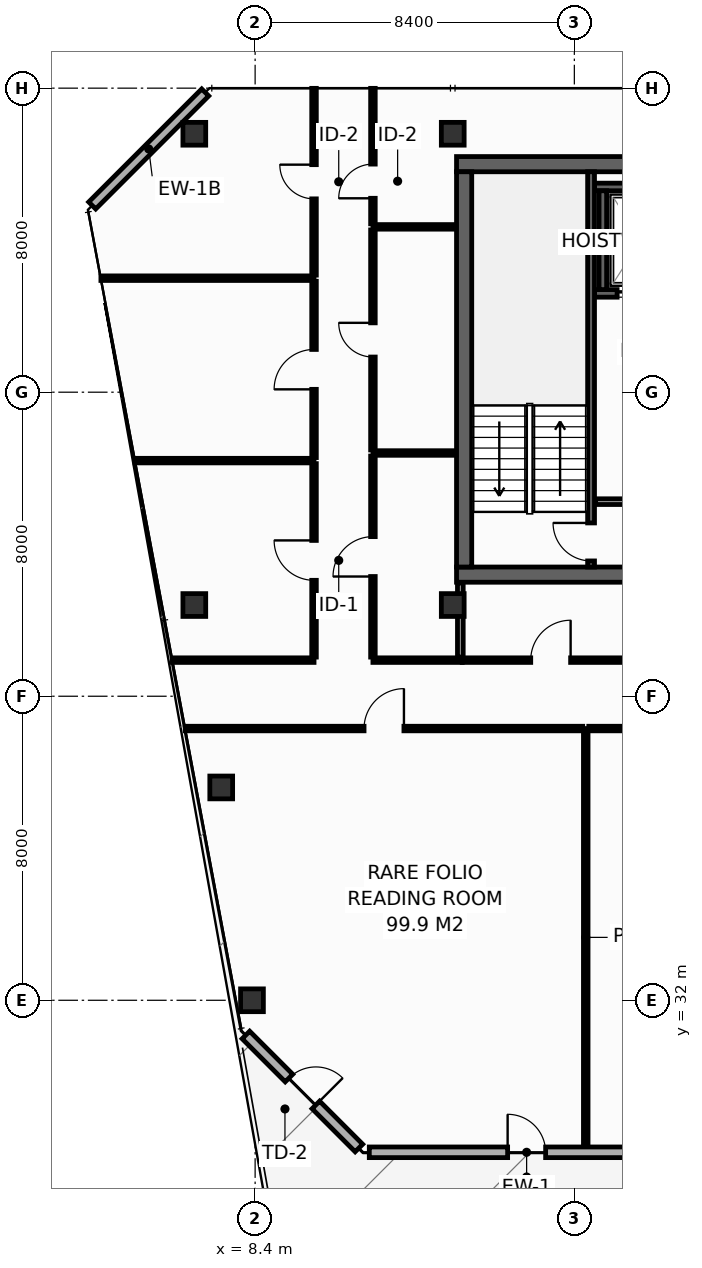
"""IFC4 building model, lengths in metres.
Left out: names, types, materials, properties, quantities, classifications, styles, units other than length and angle.
Written with IfcOpenShell. Run it as: python <this file> out.ifc"""

import sys

from ifc_helpers import new_model, si_unit, direction, frame, frame_2d, origin, origin_2d, place, context, subcontext, project, spatial, rectangle, hollow_rectangle, extrude, element, fill, save


model = new_model("IFC4")
c1 = context("Model", 3, precision=1e-05, world=origin(), true_north=direction((0.0, 1.0)))
c2 = subcontext(c1, "Body", "Model", "MODEL_VIEW")
j1 = project(units=[si_unit("LENGTHUNIT", "METRE"), si_unit("PLANEANGLEUNIT", "RADIAN")], contexts=[c1])
p1 = place(None, origin())
s1 = spatial("IfcSite", under=j1, at=p1, CompositionType="ELEMENT")
p2 = place(p1, origin())
s2 = spatial("IfcBuilding", under=s1, at=p2, CompositionType="ELEMENT")
p3 = place(p2, frame((0.0, 0.0, 276.2)))
s3 = spatial("IfcBuildingStorey", under=s2, at=p3, CompositionType="ELEMENT", Elevation=276.2)
p4 = place(p3, frame((13.7, 43.2, 0.0), z_axis=(0.0, 0.0, 1.0), x_axis=(1.0, 0.0, 0.0)))
e1 = element("IfcWall", 1, at=p4, inside=s3, PredefinedType="SHEAR", context=c2, shape_type="SweptSolid", body=[
    extrude(rectangle(XDim=32.5, YDim=0.4, at=frame_2d((16.25, 0.0))), origin(), (0.0, 0.0, 1.0), 3.55),
])
p5 = place(p4, frame((5.4, 0.0, 0.0)))
e2 = element("IfcOpeningElement", 2, at=p5, cuts=e1, PredefinedType="OPENING", context=c2, shape_type="SweptSolid", body=[
    extrude(rectangle(XDim=1.1, YDim=2.15, at=frame_2d((0.55, 1.075))), frame((0.0, 0.21, 0.0), z_axis=(0.0, -1.0, 0.0), x_axis=(1.0, 0.0, 0.0)), (0.0, 0.0, 1.0), 0.42),
])
p6 = place(p4, frame((25.6, 0.0, 0.0)))
e3 = element("IfcOpeningElement", 3, at=p6, cuts=e1, PredefinedType="OPENING", context=c2, shape_type="SweptSolid", body=[
    extrude(rectangle(XDim=1.1, YDim=2.15, at=frame_2d((0.55, 1.075))), frame((0.0, 0.21, 0.0), z_axis=(0.0, -1.0, 0.0), x_axis=(1.0, 0.0, 0.0)), (0.0, 0.0, 1.0), 0.42),
])
p7 = place(p3, frame((13.7, 54.0, 0.0), z_axis=(0.0, 0.0, 1.0), x_axis=(1.0, 0.0, 0.0)))
e4 = element("IfcWall", 4, at=p7, inside=s3, PredefinedType="SHEAR", context=c2, shape_type="SweptSolid", body=[
    extrude(rectangle(XDim=32.5, YDim=0.4, at=frame_2d((16.25, 0.0))), origin(), (0.0, 0.0, 1.0), 3.55),
])
p8 = place(p3, frame((13.9, 43.4, 0.0), z_axis=(0.0, 0.0, 1.0), x_axis=(0.0, 1.0, 0.0)))
e5 = element("IfcWall", 5, at=p8, inside=s3, PredefinedType="SHEAR", context=c2, shape_type="SweptSolid", body=[
    extrude(rectangle(XDim=10.4, YDim=0.4, at=frame_2d((5.2, 0.0))), origin(), (0.0, 0.0, 1.0), 3.55),
])
for number, where, z_axis, x_axis in (
    (6, (6.8, 54.8, 0.0), (0.0, 0.0, 1.0), (1.0, 0.0, 0.0)),
    (7, (13.6, 54.8, 0.0), (0.0, 0.0, 1.0), (1.0, 0.0, 0.0)),
    (8, (6.8, 42.4, 0.0), (0.0, 0.0, 1.0), (1.0, 0.0, 0.0)),
    (9, (13.6, 42.4, 0.0), (0.0, 0.0, 1.0), (1.0, 0.0, 0.0)),
    (10, (8.317, 32.0, 0.0), (0.0, 0.0, 1.0), (1.0, 0.0, 0.0)),
    (11, (7.508, 37.6, 0.0), (0.0, 0.0, 1.0), (1.0, 0.0, 0.0)),
):
    element("IfcColumn", number, at=place(p3, frame(where, z_axis=z_axis, x_axis=x_axis)), inside=s3, PredefinedType="COLUMN", context=c2, shape_type="SweptSolid", body=[
        extrude(hollow_rectangle(XDim=0.6, YDim=0.6, WallThickness=0.028, at=origin_2d()), origin(), (0.0, 0.0, 1.0), 3.8),
    ])
p9 = place(p3, frame((17.33, 50.6, 0.0), z_axis=(0.0, 0.0, 1.0), x_axis=(1.0, 0.0, 0.0)))
e12 = element("IfcWall", 12, at=p9, inside=s3, PredefinedType="SHEAR", context=c2, shape_type="SweptSolid", body=[
    extrude(rectangle(XDim=2.52, YDim=0.2, at=frame_2d((1.26, 0.0))), origin(), (0.0, 0.0, 1.0), 3.55),
])
p10 = place(p9, frame((0.595, 0.0, 0.0)))
e13 = element("IfcOpeningElement", 13, at=p10, cuts=e12, PredefinedType="OPENING", context=c2, shape_type="SweptSolid", body=[
    extrude(rectangle(XDim=1.25, YDim=2.3, at=frame_2d((0.625, 1.15))), frame((0.0, 0.11, 0.0), z_axis=(0.0, -1.0, 0.0), x_axis=(1.0, 0.0, 0.0)), (0.0, 0.0, 1.0), 0.22),
])
p11 = place(p3, frame((17.33, 53.4, 0.0), z_axis=(0.0, 0.0, 1.0), x_axis=(1.0, 0.0, 0.0)))
e14 = element("IfcWall", 14, at=p11, inside=s3, PredefinedType="SHEAR", context=c2, shape_type="SweptSolid", body=[
    extrude(rectangle(XDim=2.52, YDim=0.2, at=frame_2d((1.26, 0.0))), origin(), (0.0, 0.0, 1.0), 3.55),
])
p12 = place(p3, frame((17.55, 50.7, 0.0), z_axis=(0.0, 0.0, 1.0), x_axis=(0.0, 1.0, 0.0)))
e15 = element("IfcWall", 15, at=p12, inside=s3, PredefinedType="SHEAR", context=c2, shape_type="SweptSolid", body=[
    extrude(rectangle(XDim=2.6, YDim=0.2, at=frame_2d((1.3, 0.0))), origin(), (0.0, 0.0, 1.0), 3.55),
])
p13 = place(p3, frame((17.24, 43.4, 0.0), z_axis=(0.0, 0.0, 1.0), x_axis=(0.0, 1.0, 0.0)))
e16 = element("IfcWall", 16, at=p13, inside=s3, PredefinedType="SHEAR", context=c2, shape_type="SweptSolid", body=[
    extrude(rectangle(XDim=10.4, YDim=0.18, at=frame_2d((5.2, 0.0))), origin(), (0.0, 0.0, 1.0), 3.55),
])
p14 = place(p13, frame((0.16, 0.0, 0.0)))
e17 = element("IfcOpeningElement", 17, at=p14, cuts=e16, PredefinedType="OPENING", context=c2, shape_type="SweptSolid", body=[
    extrude(rectangle(XDim=1.0, YDim=2.15, at=frame_2d((0.5, 1.075))), frame((0.0, 0.1, 0.0), z_axis=(0.0, -1.0, 0.0), x_axis=(1.0, 0.0, 0.0)), (0.0, 0.0, 1.0), 0.2),
])
p15 = place(p3, frame((17.36, 45.12, 0.0), z_axis=(0.0, 0.0, 1.0), x_axis=(1.0, 0.0, 0.0)))
e18 = element("IfcWall", 18, at=p15, inside=s3, PredefinedType="PARTITIONING", context=c2, shape_type="SweptSolid", body=[
    extrude(rectangle(XDim=5.14, YDim=0.15, at=frame_2d((2.57, 0.0))), origin(), (0.0, 0.0, 1.0), 3.55),
])
p16 = place(p15, frame((1.8, 0.0, 0.0)))
e19 = element("IfcOpeningElement", 19, at=p16, cuts=e18, PredefinedType="OPENING", context=c2, shape_type="SweptSolid", body=[
    extrude(rectangle(XDim=1.1, YDim=2.15, at=frame_2d((0.55, 1.075))), frame((0.0, 0.085, 0.0), z_axis=(0.0, -1.0, 0.0), x_axis=(1.0, 0.0, 0.0)), (0.0, 0.0, 1.0), 0.17),
])
p17 = place(p3, frame((8.157, 31.087, 0.0), z_axis=(0.0, 0.0, 1.0), x_axis=(0.707106781187, -0.707106781187, 0.0)))
e20 = element("IfcWall", 20, at=p17, inside=s3, PredefinedType="STANDARD", context=c2, shape_type="SweptSolid", body=[
    extrude(rectangle(XDim=4.206, YDim=0.28, at=frame_2d((2.103, 0.0))), origin(), (0.0, 0.0, 1.0), 3.55),
])
p18 = place(p17, frame((1.603, 0.0, 0.0)))
e21 = element("IfcOpeningElement", 21, at=p18, cuts=e20, PredefinedType="OPENING", context=c2, shape_type="SweptSolid", body=[
    extrude(rectangle(XDim=1.0, YDim=2.2, at=frame_2d((0.5, 1.1))), frame((0.0, 0.15, 0.0), z_axis=(0.0, -1.0, 0.0), x_axis=(1.0, 0.0, 0.0)), (0.0, 0.0, 1.0), 0.3),
])
p19 = place(p3, frame((11.404, 28.0, 0.0), z_axis=(0.0, 0.0, 1.0), x_axis=(1.0, 0.0, 0.0)))
e22 = element("IfcWall", 22, at=p19, inside=s3, PredefinedType="STANDARD", context=c2, shape_type="SweptSolid", body=[
    extrude(rectangle(XDim=8.28, YDim=0.28, at=frame_2d((4.14, 0.0))), origin(), (0.0, 0.0, 1.0), 3.55),
])
p20 = place(p19, frame((3.64, 0.0, 0.0)))
e23 = element("IfcOpeningElement", 23, at=p20, cuts=e22, PredefinedType="OPENING", context=c2, shape_type="SweptSolid", body=[
    extrude(rectangle(XDim=1.0, YDim=2.2, at=frame_2d((0.5, 1.1))), frame((0.0, 0.15, 0.0), z_axis=(0.0, -1.0, 0.0), x_axis=(1.0, 0.0, 0.0)), (0.0, 0.0, 1.0), 0.3),
])
p21 = place(p3, frame((7.087, 55.887, 0.0), z_axis=(0.0, 0.0, 1.0), x_axis=(-0.707106781187, -0.707106781187, 0.0)))
e24 = element("IfcWall", 24, at=p21, inside=s3, PredefinedType="STANDARD", context=c2, shape_type="SweptSolid", body=[
    extrude(rectangle(XDim=4.206, YDim=0.26, at=frame_2d((2.103, 0.0))), origin(), (0.0, 0.0, 1.0), 3.55),
])
p22 = place(p3, frame((6.224, 40.95, 0.0), z_axis=(0.0, 0.0, 1.0), x_axis=(1.0, 0.0, 0.0)))
e25 = element("IfcWall", 25, at=p22, inside=s3, PredefinedType="PARTITIONING", context=c2, shape_type="SweptSolid", body=[
    extrude(rectangle(XDim=3.726, YDim=0.12, at=frame_2d((1.863, 0.0))), origin(), (0.0, 0.0, 1.0), 3.085),
])
p23 = place(p3, frame((11.5, 40.95, 0.0), z_axis=(0.0, 0.0, 1.0), x_axis=(1.0, 0.0, 0.0)))
e26 = element("IfcWall", 26, at=p23, inside=s3, PredefinedType="PARTITIONING", context=c2, shape_type="SweptSolid", body=[
    extrude(rectangle(XDim=2.35, YDim=0.12, at=frame_2d((1.175, 0.0))), origin(), (0.0, 0.0, 1.0), 3.55),
])
p24 = place(p3, frame((11.5, 52.35, 0.0), z_axis=(0.0, 0.0, 1.0), x_axis=(1.0, 0.0, 0.0)))
e27 = element("IfcWall", 27, at=p24, inside=s3, PredefinedType="PARTITIONING", context=c2, shape_type="SweptSolid", body=[
    extrude(rectangle(XDim=2.18, YDim=0.12, at=frame_2d((1.09, 0.0))), origin(), (0.0, 0.0, 1.0), 3.55),
])
p25 = place(p3, frame((11.5, 52.43, 0.0), z_axis=(0.0, 0.0, 1.0), x_axis=(0.0, 1.0, 0.0)))
e28 = element("IfcWall", 28, at=p25, inside=s3, PredefinedType="PARTITIONING", context=c2, shape_type="SweptSolid", body=[
    extrude(rectangle(XDim=3.565, YDim=0.12, at=frame_2d((1.783, 0.0))), origin(), (0.0, 0.0, 1.0), 2.935),
])
p26 = place(p25, frame((0.672, 0.0, 0.0)))
e29 = element("IfcOpeningElement", 29, at=p26, cuts=e28, PredefinedType="OPENING", context=c2, shape_type="SweptSolid", body=[
    extrude(rectangle(XDim=0.9, YDim=2.1, at=frame_2d((0.45, 1.05))), frame((0.0, 0.07, 0.0), z_axis=(0.0, -1.0, 0.0), x_axis=(1.0, 0.0, 0.0)), (0.0, 0.0, 1.0), 0.14),
])
p27 = place(p3, frame((5.241, 46.2, 0.0), z_axis=(0.0, 0.0, 1.0), x_axis=(1.0, 0.0, 0.0)))
e30 = element("IfcWall", 30, at=p27, inside=s3, PredefinedType="PARTITIONING", context=c2, shape_type="SweptSolid", body=[
    extrude(rectangle(XDim=4.709, YDim=0.12, at=frame_2d((2.354, 0.0))), origin(), (0.0, 0.0, 1.0), 2.947),
])
p28 = place(p3, frame((4.342, 51.0, 0.0), z_axis=(0.0, 0.0, 1.0), x_axis=(1.0, 0.0, 0.0)))
e31 = element("IfcWall", 31, at=p28, inside=s3, PredefinedType="PARTITIONING", context=c2, shape_type="SweptSolid", body=[
    extrude(rectangle(XDim=5.608, YDim=0.12, at=frame_2d((2.804, 0.0))), origin(), (0.0, 0.0, 1.0), 2.947),
])
p29 = place(p3, frame((9.95, 41.03, 0.0), z_axis=(0.0, 0.0, 1.0), x_axis=(0.0, 1.0, 0.0)))
e32 = element("IfcWall", 32, at=p29, inside=s3, PredefinedType="PARTITIONING", context=c2, shape_type="SweptSolid", body=[
    extrude(rectangle(XDim=5.09, YDim=0.12, at=frame_2d((2.545, 0.0))), origin(), (0.0, 0.0, 1.0), 2.947),
])
p30 = place(p29, frame((2.02, 0.0, 0.0)))
e33 = element("IfcOpeningElement", 33, at=p30, cuts=e32, PredefinedType="OPENING", context=c2, shape_type="SweptSolid", body=[
    extrude(rectangle(XDim=1.05, YDim=2.15, at=frame_2d((0.525, 1.075))), frame((0.0, 0.07, 0.0), z_axis=(0.0, -1.0, 0.0), x_axis=(1.0, 0.0, 0.0)), (0.0, 0.0, 1.0), 0.14),
])
p31 = place(p3, frame((9.95, 46.28, 0.0), z_axis=(0.0, 0.0, 1.0), x_axis=(0.0, 1.0, 0.0)))
e34 = element("IfcWall", 34, at=p31, inside=s3, PredefinedType="PARTITIONING", context=c2, shape_type="SweptSolid", body=[
    extrude(rectangle(XDim=4.64, YDim=0.12, at=frame_2d((2.32, 0.0))), origin(), (0.0, 0.0, 1.0), 3.55),
])
p32 = place(p31, frame((1.795, 0.0, 0.0)))
e35 = element("IfcOpeningElement", 35, at=p32, cuts=e34, PredefinedType="OPENING", context=c2, shape_type="SweptSolid", body=[
    extrude(rectangle(XDim=1.05, YDim=2.15, at=frame_2d((0.525, 1.075))), frame((0.0, 0.07, 0.0), z_axis=(0.0, -1.0, 0.0), x_axis=(1.0, 0.0, 0.0)), (0.0, 0.0, 1.0), 0.14),
])
p33 = place(p3, frame((9.95, 51.08, 0.0), z_axis=(0.0, 0.0, 1.0), x_axis=(0.0, 1.0, 0.0)))
e36 = element("IfcWall", 36, at=p33, inside=s3, PredefinedType="PARTITIONING", context=c2, shape_type="SweptSolid", body=[
    extrude(rectangle(XDim=4.915, YDim=0.12, at=frame_2d((2.458, 0.0))), origin(), (0.0, 0.0, 1.0), 2.935),
])
p34 = place(p33, frame((2.007, 0.0, 0.0)))
e37 = element("IfcOpeningElement", 37, at=p34, cuts=e36, PredefinedType="OPENING", context=c2, shape_type="SweptSolid", body=[
    extrude(rectangle(XDim=0.9, YDim=2.1, at=frame_2d((0.45, 1.05))), frame((0.0, 0.07, 0.0), z_axis=(0.0, -1.0, 0.0), x_axis=(1.0, 0.0, 0.0)), (0.0, 0.0, 1.0), 0.14),
])
p35 = place(p3, frame((11.5, 46.4, 0.0), z_axis=(0.0, 0.0, 1.0), x_axis=(1.0, 0.0, 0.0)))
e38 = element("IfcWall", 38, at=p35, inside=s3, PredefinedType="PARTITIONING", context=c2, shape_type="SweptSolid", body=[
    extrude(rectangle(XDim=2.18, YDim=0.12, at=frame_2d((1.09, 0.0))), origin(), (0.0, 0.0, 1.0), 3.55),
])
p36 = place(p3, frame((11.5, 41.03, 0.0), z_axis=(0.0, 0.0, 1.0), x_axis=(0.0, 1.0, 0.0)))
e39 = element("IfcWall", 39, at=p36, inside=s3, PredefinedType="PARTITIONING", context=c2, shape_type="SweptSolid", body=[
    extrude(rectangle(XDim=5.29, YDim=0.12, at=frame_2d((2.645, 0.0))), origin(), (0.0, 0.0, 1.0), 2.947),
])
p37 = place(p36, frame((2.12, 0.0, 0.0)))
e40 = element("IfcOpeningElement", 40, at=p37, cuts=e39, PredefinedType="OPENING", context=c2, shape_type="SweptSolid", body=[
    extrude(rectangle(XDim=1.05, YDim=2.15, at=frame_2d((0.525, 1.075))), frame((0.0, 0.07, 0.0), z_axis=(0.0, -1.0, 0.0), x_axis=(1.0, 0.0, 0.0)), (0.0, 0.0, 1.0), 0.14),
])
p38 = place(p3, frame((11.5, 46.48, 0.0), z_axis=(0.0, 0.0, 1.0), x_axis=(0.0, 1.0, 0.0)))
e41 = element("IfcWall", 41, at=p38, inside=s3, PredefinedType="PARTITIONING", context=c2, shape_type="SweptSolid", body=[
    extrude(rectangle(XDim=5.79, YDim=0.12, at=frame_2d((2.895, 0.0))), origin(), (0.0, 0.0, 1.0), 3.55),
])
p39 = place(p38, frame((2.445, 0.0, 0.0)))
e42 = element("IfcOpeningElement", 42, at=p39, cuts=e41, PredefinedType="OPENING", context=c2, shape_type="SweptSolid", body=[
    extrude(rectangle(XDim=0.9, YDim=2.1, at=frame_2d((0.45, 1.05))), frame((0.0, 0.07, 0.0), z_axis=(0.0, -1.0, 0.0), x_axis=(1.0, 0.0, 0.0)), (0.0, 0.0, 1.0), 0.14),
])
p40 = place(p3, frame((13.8, 41.03, 0.0), z_axis=(0.0, 0.0, 1.0), x_axis=(0.0, 1.0, 0.0)))
e43 = element("IfcWall", 43, at=p40, inside=s3, PredefinedType="PARTITIONING", context=c2, shape_type="SweptSolid", body=[
    extrude(rectangle(XDim=1.95, YDim=0.15, at=frame_2d((0.975, 0.0))), origin(), (0.0, 0.0, 1.0), 3.55),
])
p41 = place(p3, frame((13.85, 40.95, 0.0), z_axis=(0.0, 0.0, 1.0), x_axis=(1.0, 0.0, 0.0)))
e44 = element("IfcWall", 44, at=p41, inside=s3, PredefinedType="PARTITIONING", context=c2, shape_type="SweptSolid", body=[
    extrude(rectangle(XDim=4.655, YDim=0.12, at=frame_2d((2.327, 0.0))), origin(), (0.0, 0.0, 1.0), 3.55),
])
p42 = place(p41, frame((1.802, 0.0, 0.0)))
e45 = element("IfcOpeningElement", 45, at=p42, cuts=e44, PredefinedType="OPENING", context=c2, shape_type="SweptSolid", body=[
    extrude(rectangle(XDim=1.05, YDim=2.15, at=frame_2d((0.525, 1.075))), frame((0.0, 0.07, 0.0), z_axis=(0.0, -1.0, 0.0), x_axis=(1.0, 0.0, 0.0)), (0.0, 0.0, 1.0), 0.14),
])
p43 = place(p3, frame((17.1, 28.16, 0.0), z_axis=(0.0, 0.0, 1.0), x_axis=(0.0, 1.0, 0.0)))
e46 = element("IfcWall", 46, at=p43, inside=s3, PredefinedType="PARTITIONING", context=c2, shape_type="SweptSolid", body=[
    extrude(rectangle(XDim=10.99, YDim=0.12, at=frame_2d((5.495, 0.0))), origin(), (0.0, 0.0, 1.0), 2.947),
])
p44 = place(p3, frame((6.561, 39.15, 0.0), z_axis=(0.0, 0.0, 1.0), x_axis=(1.0, 0.0, 0.0)))
e47 = element("IfcWall", 47, at=p44, inside=s3, PredefinedType="PARTITIONING", context=c2, shape_type="SweptSolid", body=[
    extrude(rectangle(XDim=10.459, YDim=0.12, at=frame_2d((5.229, 0.0))), origin(), (0.0, 0.0, 1.0), 3.085),
])
p45 = place(p44, frame((4.705, 0.0, 0.0)))
e48 = element("IfcOpeningElement", 48, at=p45, cuts=e47, PredefinedType="OPENING", context=c2, shape_type="SweptSolid", body=[
    extrude(rectangle(XDim=1.05, YDim=2.15, at=frame_2d((0.525, 1.075))), frame((0.0, 0.07, 0.0), z_axis=(0.0, -1.0, 0.0), x_axis=(1.0, 0.0, 0.0)), (0.0, 0.0, 1.0), 0.14),
])
p46 = place(p3, frame((17.18, 39.15, 0.0), z_axis=(0.0, 0.0, 1.0), x_axis=(1.0, 0.0, 0.0)))
e49 = element("IfcWall", 49, at=p46, inside=s3, PredefinedType="PARTITIONING", context=c2, shape_type="SweptSolid", body=[
    extrude(rectangle(XDim=6.503, YDim=0.12, at=frame_2d((3.251, 0.0))), origin(), (0.0, 0.0, 1.0), 2.947),
])
p47 = place(p46, frame((2.726, 0.0, 0.0)))
e50 = element("IfcOpeningElement", 50, at=p47, cuts=e49, PredefinedType="OPENING", context=c2, shape_type="SweptSolid", body=[
    extrude(rectangle(XDim=1.05, YDim=2.15, at=frame_2d((0.525, 1.075))), frame((0.0, 0.07, 0.0), z_axis=(0.0, -1.0, 0.0), x_axis=(1.0, 0.0, 0.0)), (0.0, 0.0, 1.0), 0.14),
])
p48 = place(p10, origin())
e51 = element("IfcDoor", 51, at=p48, inside=s3, OperationType="SLIDING_TO_LEFT", PredefinedType="DOOR", context=c2, shape_type="SweptSolid", body=[
    extrude(rectangle(XDim=1.25, YDim=2.3, at=frame_2d((0.625, 1.15))), frame((0.0, 0.025, 0.0), z_axis=(0.0, -1.0, 0.0), x_axis=(1.0, 0.0, 0.0)), (0.0, 0.0, 1.0), 0.05),
])
fill(e13, e51)
p49 = place(p14, origin())
e52 = element("IfcDoor", 52, at=p49, inside=s3, OperationType="SINGLE_SWING_RIGHT", PredefinedType="DOOR", context=c2, shape_type="SweptSolid", body=[
    extrude(rectangle(XDim=1.0, YDim=2.15, at=frame_2d((0.5, 1.075))), frame((0.0, 0.025, 0.0), z_axis=(0.0, -1.0, 0.0), x_axis=(1.0, 0.0, 0.0)), (0.0, 0.0, 1.0), 0.05),
])
fill(e17, e52)
p50 = place(p18, origin())
e53 = element("IfcDoor", 53, at=p50, inside=s3, OperationType="SINGLE_SWING_RIGHT", PredefinedType="DOOR", context=c2, shape_type="SweptSolid", body=[
    extrude(rectangle(XDim=1.0, YDim=2.2, at=frame_2d((0.5, 1.1))), frame((0.0, 0.025, 0.0), z_axis=(0.0, -1.0, 0.0), x_axis=(1.0, 0.0, 0.0)), (0.0, 0.0, 1.0), 0.05),
])
fill(e21, e53)
p51 = place(p20, origin())
e54 = element("IfcDoor", 54, at=p51, inside=s3, OperationType="SINGLE_SWING_LEFT", PredefinedType="DOOR", context=c2, shape_type="SweptSolid", body=[
    extrude(rectangle(XDim=1.0, YDim=2.2, at=frame_2d((0.5, 1.1))), frame((0.0, 0.025, 0.0), z_axis=(0.0, -1.0, 0.0), x_axis=(1.0, 0.0, 0.0)), (0.0, 0.0, 1.0), 0.05),
])
fill(e23, e54)
p52 = place(p26, origin())
e55 = element("IfcDoor", 55, at=p52, inside=s3, OperationType="SINGLE_SWING_LEFT", PredefinedType="DOOR", context=c2, shape_type="SweptSolid", body=[
    extrude(rectangle(XDim=0.9, YDim=2.1, at=frame_2d((0.45, 1.05))), frame((0.0, 0.025, 0.0), z_axis=(0.0, -1.0, 0.0), x_axis=(1.0, 0.0, 0.0)), (0.0, 0.0, 1.0), 0.05),
])
fill(e29, e55)
p53 = place(p30, origin())
e56 = element("IfcDoor", 56, at=p53, inside=s3, OperationType="SINGLE_SWING_RIGHT", PredefinedType="DOOR", context=c2, shape_type="SweptSolid", body=[
    extrude(rectangle(XDim=1.05, YDim=2.15, at=frame_2d((0.525, 1.075))), frame((0.0, 0.025, 0.0), z_axis=(0.0, -1.0, 0.0), x_axis=(1.0, 0.0, 0.0)), (0.0, 0.0, 1.0), 0.05),
])
fill(e33, e56)
p54 = place(p32, origin())
e57 = element("IfcDoor", 57, at=p54, inside=s3, OperationType="SINGLE_SWING_LEFT", PredefinedType="DOOR", context=c2, shape_type="SweptSolid", body=[
    extrude(rectangle(XDim=1.05, YDim=2.15, at=frame_2d((0.525, 1.075))), frame((0.0, 0.025, 0.0), z_axis=(0.0, -1.0, 0.0), x_axis=(1.0, 0.0, 0.0)), (0.0, 0.0, 1.0), 0.05),
])
fill(e35, e57)
p55 = place(p34, origin())
e58 = element("IfcDoor", 58, at=p55, inside=s3, OperationType="SINGLE_SWING_RIGHT", PredefinedType="DOOR", context=c2, shape_type="SweptSolid", body=[
    extrude(rectangle(XDim=0.9, YDim=2.1, at=frame_2d((0.45, 1.05))), frame((0.0, 0.025, 0.0), z_axis=(0.0, -1.0, 0.0), x_axis=(1.0, 0.0, 0.0)), (0.0, 0.0, 1.0), 0.05),
])
fill(e37, e58)
p56 = place(p37, origin())
e59 = element("IfcDoor", 59, at=p56, inside=s3, OperationType="SINGLE_SWING_LEFT", PredefinedType="DOOR", context=c2, shape_type="SweptSolid", body=[
    extrude(rectangle(XDim=1.05, YDim=2.15, at=frame_2d((0.525, 1.075))), frame((0.0, 0.025, 0.0), z_axis=(0.0, -1.0, 0.0), x_axis=(1.0, 0.0, 0.0)), (0.0, 0.0, 1.0), 0.05),
])
fill(e40, e59)
p57 = place(p39, origin())
e60 = element("IfcDoor", 60, at=p57, inside=s3, OperationType="SINGLE_SWING_RIGHT", PredefinedType="DOOR", context=c2, shape_type="SweptSolid", body=[
    extrude(rectangle(XDim=0.9, YDim=2.1, at=frame_2d((0.45, 1.05))), frame((0.0, 0.025, 0.0), z_axis=(0.0, -1.0, 0.0), x_axis=(1.0, 0.0, 0.0)), (0.0, 0.0, 1.0), 0.05),
])
fill(e42, e60)
p58 = place(p42, origin())
e61 = element("IfcDoor", 61, at=p58, inside=s3, OperationType="SINGLE_SWING_RIGHT", PredefinedType="DOOR", context=c2, shape_type="SweptSolid", body=[
    extrude(rectangle(XDim=1.05, YDim=2.15, at=frame_2d((0.525, 1.075))), frame((0.0, 0.025, 0.0), z_axis=(0.0, -1.0, 0.0), x_axis=(1.0, 0.0, 0.0)), (0.0, 0.0, 1.0), 0.05),
])
fill(e45, e61)
p59 = place(p45, origin())
e62 = element("IfcDoor", 62, at=p59, inside=s3, OperationType="SINGLE_SWING_RIGHT", PredefinedType="DOOR", context=c2, shape_type="SweptSolid", body=[
    extrude(rectangle(XDim=1.05, YDim=2.15, at=frame_2d((0.525, 1.075))), frame((0.0, 0.025, 0.0), z_axis=(0.0, -1.0, 0.0), x_axis=(1.0, 0.0, 0.0)), (0.0, 0.0, 1.0), 0.05),
])
fill(e48, e62)
save(model, sys.argv[1])
